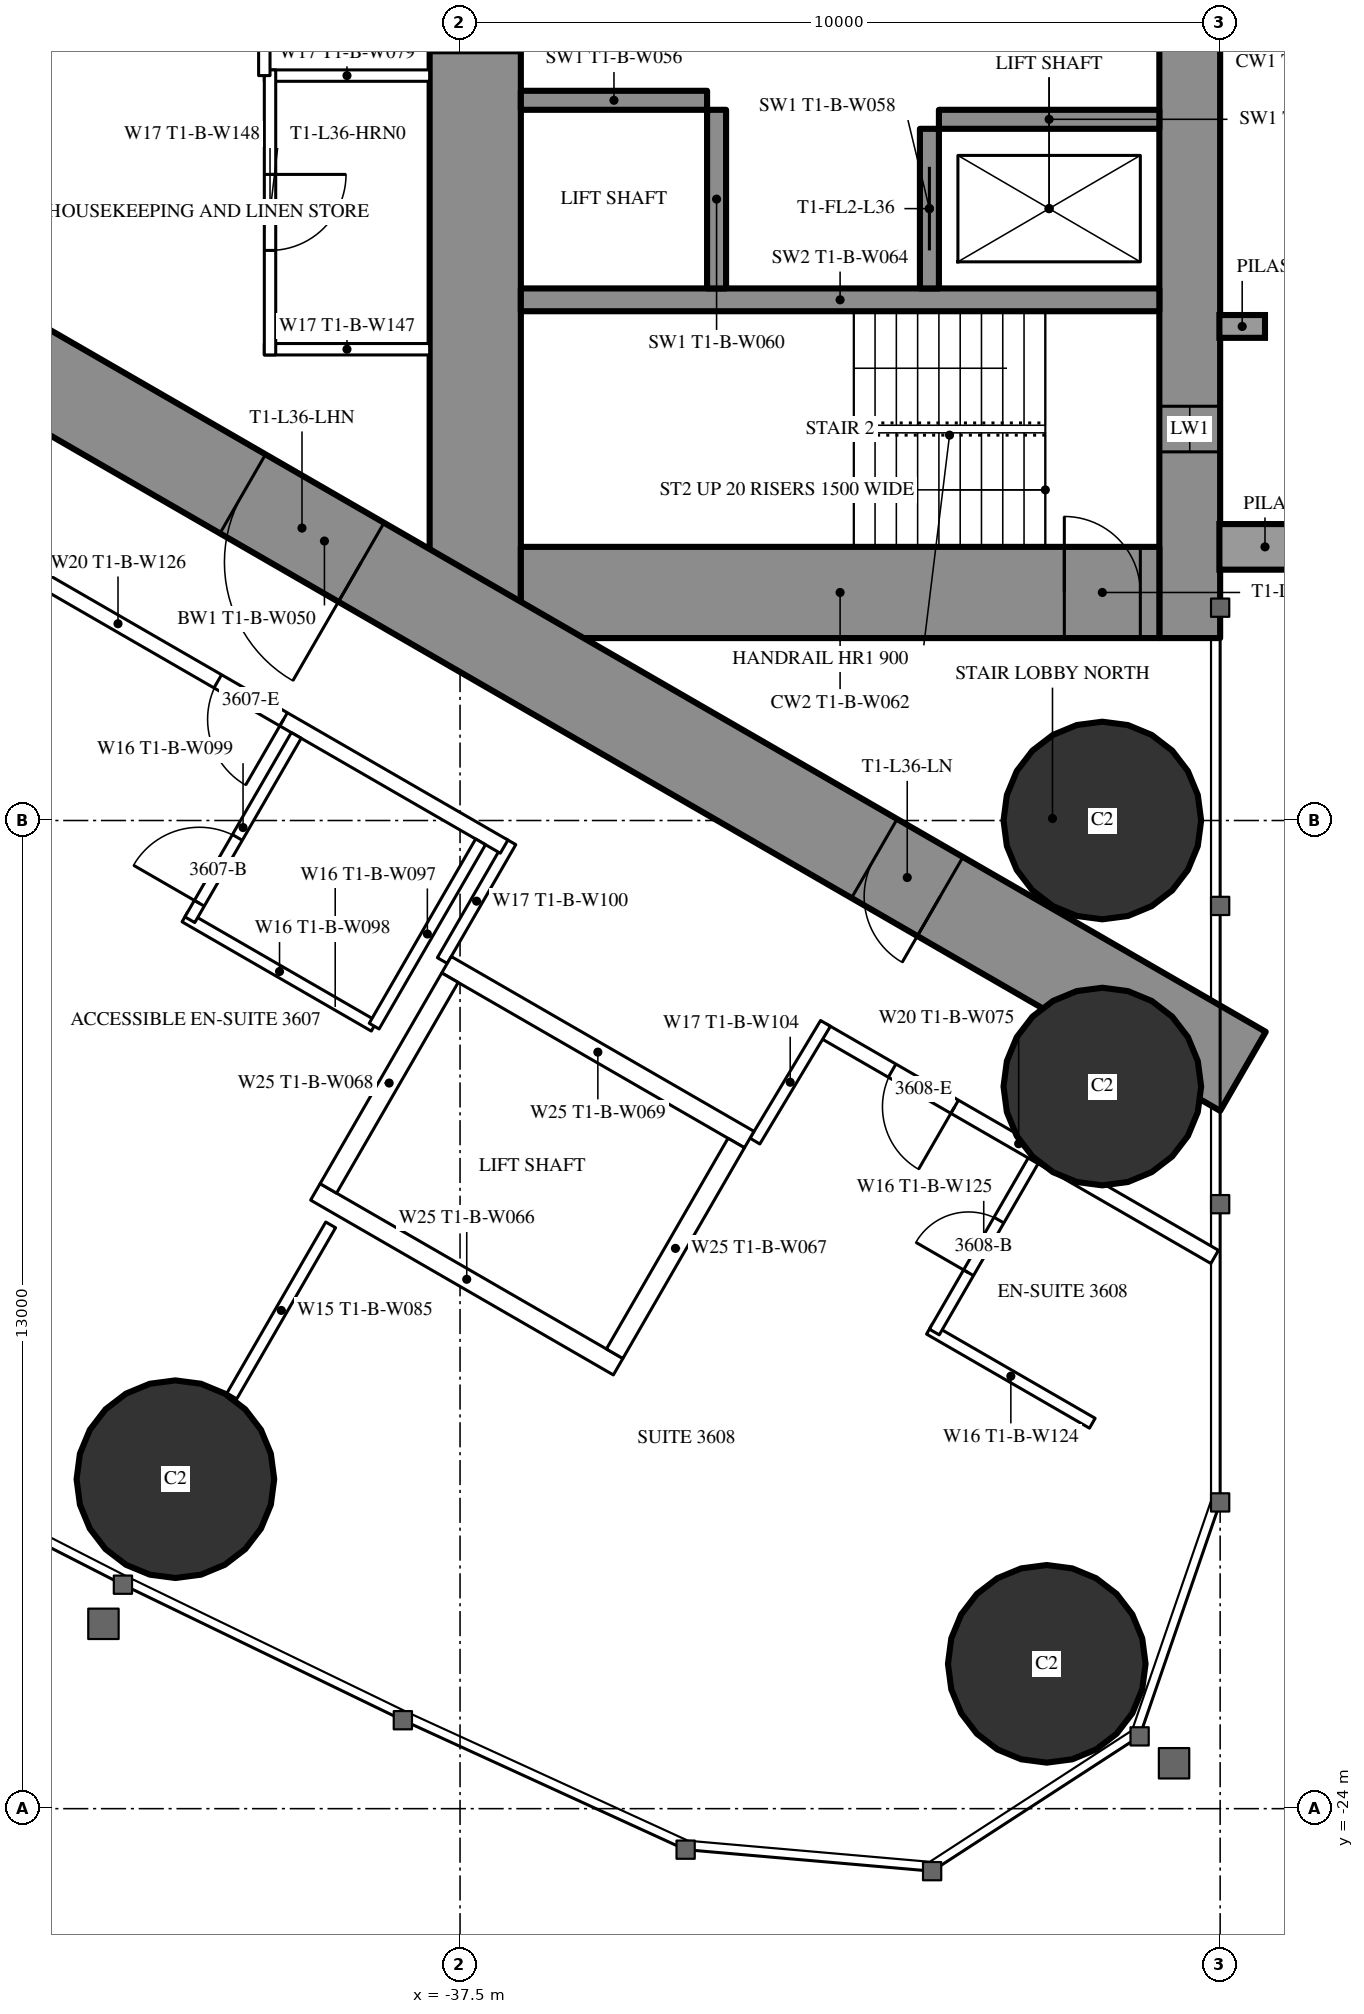
"""IFC4 building model, lengths in metres.
Left out: names, types, materials, properties, quantities, classifications, styles, units other than length and angle.
Written with IfcOpenShell. Run it as: python <this file> out.ifc"""

import sys

from ifc_helpers import new_model, si_unit, direction, frame, frame_2d, origin, origin_2d, place, context, subcontext, project, spatial, rectangle, hollow_circle, extrude, element, fill, save


model = new_model("IFC4")
c1 = context("Model", 3, precision=1e-05, world=origin(), true_north=direction((0.0, 1.0)))
c2 = subcontext(c1, "Body", "Model", "MODEL_VIEW")
j1 = project(units=[si_unit("LENGTHUNIT", "METRE"), si_unit("PLANEANGLEUNIT", "RADIAN")], contexts=[c1])
p1 = place(None, origin())
s1 = spatial("IfcSite", under=j1, at=p1, CompositionType="ELEMENT")
p2 = place(p1, origin())
s2 = spatial("IfcBuilding", under=s1, at=p2, CompositionType="ELEMENT")
p3 = place(p2, frame((0.0, 0.0, 136.1)))
s3 = spatial("IfcBuildingStorey", under=s2, at=p3, CompositionType="ELEMENT", Elevation=136.1)
for number, where, z_axis, x_axis in (
    (1, (-29.781, -22.095, 0.0), (0.0, 0.0, 1.0), (1.0, 0.0, 0.0)),
    (2, (-29.05, -11.0, 0.0), (0.0, 0.0, 1.0), (1.0, 0.0, 0.0)),
    (3, (-29.05, -14.5, 0.0), (0.0, 0.0, 1.0), (1.0, 0.0, 0.0)),
    (4, (-41.245, -19.666, 0.0), (0.0, 0.0, 1.0), (1.0, 0.0, 0.0)),
):
    element("IfcColumn", number, at=place(p3, frame(where, z_axis=z_axis, x_axis=x_axis)), inside=s3, PredefinedType="COLUMN", context=c2, shape_type="SweptSolid", body=[
        extrude(hollow_circle(Radius=1.3, WallThickness=0.1, at=origin_2d()), origin(), (0.0, 0.0, 1.0), 3.5),
    ])
p4 = place(p3, frame((-27.9, 8.6, 0.0), z_axis=(0.0, 0.0, 1.0), x_axis=(0.0, -1.0, 0.0)))
e5 = element("IfcWall", 5, at=p4, inside=s3, PredefinedType="SHEAR", context=c2, shape_type="SweptSolid", body=[
    extrude(rectangle(XDim=17.2, YDim=0.8, at=frame_2d((8.6, 0.0))), origin(), (0.0, 0.0, 1.0), 3.5),
])
p5 = place(p4, frame((2.45, 0.0, 0.6)))
e6 = element("IfcOpeningElement", 6, at=p5, cuts=e5, PredefinedType="OPENING", context=c2, shape_type="SweptSolid", body=[
    extrude(rectangle(XDim=0.6, YDim=2.1, at=frame_2d((0.3, 1.05))), frame((0.0, 0.41, 0.0), z_axis=(0.0, -1.0, 0.0), x_axis=(1.0, 0.0, 0.0)), (0.0, 0.0, 1.0), 0.82),
])
p6 = place(p4, frame((14.15, 0.0, 0.6)))
e7 = element("IfcOpeningElement", 7, at=p6, cuts=e5, PredefinedType="OPENING", context=c2, shape_type="SweptSolid", body=[
    extrude(rectangle(XDim=0.6, YDim=2.1, at=frame_2d((0.3, 1.05))), frame((0.0, 0.41, 0.0), z_axis=(0.0, -1.0, 0.0), x_axis=(1.0, 0.0, 0.0)), (0.0, 0.0, 1.0), 0.82),
])
p7 = place(p3, frame((-37.3, 8.6, 0.0), z_axis=(0.0, 0.0, 1.0), x_axis=(0.0, -1.0, 0.0)))
e8 = element("IfcWall", 8, at=p7, inside=s3, PredefinedType="SHEAR", context=c2, shape_type="SweptSolid", body=[
    extrude(rectangle(XDim=17.2, YDim=1.2, at=frame_2d((8.6, 0.0))), origin(), (0.0, 0.0, 1.0), 3.5),
])
p8 = place(p7, frame((7.7, 0.0, 0.0)))
e9 = element("IfcOpeningElement", 9, at=p8, cuts=e8, PredefinedType="OPENING", context=c2, shape_type="SweptSolid", body=[
    extrude(rectangle(XDim=1.8, YDim=2.2, at=frame_2d((0.9, 1.1))), frame((0.0, 0.61, 0.0), z_axis=(0.0, -1.0, 0.0), x_axis=(1.0, 0.0, 0.0)), (0.0, 0.0, 1.0), 1.22),
])
p9 = place(p3, frame((-28.3, -8.0, 0.0), z_axis=(0.0, 0.0, 1.0), x_axis=(-1.0, 0.0, 0.0)))
e10 = element("IfcWall", 10, at=p9, inside=s3, PredefinedType="SHEAR", context=c2, shape_type="SweptSolid", body=[
    extrude(rectangle(XDim=8.4, YDim=1.2, at=frame_2d((4.2, 0.0))), origin(), (0.0, 0.0, 1.0), 3.5),
])
p10 = place(p9, frame((0.25, 0.0, 0.0)))
e11 = element("IfcOpeningElement", 11, at=p10, cuts=e10, PredefinedType="OPENING", context=c2, shape_type="SweptSolid", body=[
    extrude(rectangle(XDim=1.0, YDim=2.2, at=frame_2d((0.5, 1.1))), frame((0.0, 0.61, 0.0), z_axis=(0.0, -1.0, 0.0), x_axis=(1.0, 0.0, 0.0)), (0.0, 0.0, 1.0), 1.22),
])
p11 = place(p3, frame((-28.3, -4.15, 0.0), z_axis=(0.0, 0.0, 1.0), x_axis=(-1.0, 0.0, 0.0)))
e12 = element("IfcWall", 12, at=p11, inside=s3, PredefinedType="SHEAR", context=c2, shape_type="SweptSolid", body=[
    extrude(rectangle(XDim=8.4, YDim=0.3, at=frame_2d((4.2, 0.0))), origin(), (0.0, 0.0, 1.0), 3.5),
])
p12 = place(p3, frame((-31.325, -1.9, 0.0), z_axis=(0.0, 0.0, 1.0), x_axis=(0.0, -1.0, 0.0)))
e13 = element("IfcWall", 13, at=p12, inside=s3, PredefinedType="SHEAR", context=c2, shape_type="SweptSolid", body=[
    extrude(rectangle(XDim=2.1, YDim=0.25, at=frame_2d((1.05, 0.0))), origin(), (0.0, 0.0, 1.0), 3.5),
])
p13 = place(p12, frame((0.5, 0.0, 0.0)))
e14 = element("IfcOpeningElement", 14, at=p13, cuts=e13, PredefinedType="OPENING", context=c2, shape_type="SweptSolid", body=[
    extrude(rectangle(XDim=1.1, YDim=2.2, at=frame_2d((0.55, 1.1))), frame((0.0, 0.135, 0.0), z_axis=(0.0, -1.0, 0.0), x_axis=(1.0, 0.0, 0.0)), (0.0, 0.0, 1.0), 0.27),
])
p14 = place(p3, frame((-34.125, -1.65, 0.0), z_axis=(0.0, 0.0, 1.0), x_axis=(0.0, -1.0, 0.0)))
e15 = element("IfcWall", 15, at=p14, inside=s3, PredefinedType="SHEAR", context=c2, shape_type="SweptSolid", body=[
    extrude(rectangle(XDim=2.35, YDim=0.25, at=frame_2d((1.175, 0.0))), origin(), (0.0, 0.0, 1.0), 3.5),
])
p15 = place(p3, frame((-28.3, -1.775, 0.0), z_axis=(0.0, 0.0, 1.0), x_axis=(-1.0, 0.0, 0.0)))
e16 = element("IfcWall", 16, at=p15, inside=s3, PredefinedType="SHEAR", context=c2, shape_type="SweptSolid", body=[
    extrude(rectangle(XDim=2.9, YDim=0.25, at=frame_2d((1.45, 0.0))), origin(), (0.0, 0.0, 1.0), 3.5),
])
p16 = place(p3, frame((-34.25, -1.525, 0.0), z_axis=(0.0, 0.0, 1.0), x_axis=(-1.0, 0.0, 0.0)))
e17 = element("IfcWall", 17, at=p16, inside=s3, PredefinedType="SHEAR", context=c2, shape_type="SweptSolid", body=[
    extrude(rectangle(XDim=2.45, YDim=0.25, at=frame_2d((1.225, 0.0))), origin(), (0.0, 0.0, 1.0), 3.5),
])
p17 = place(p3, frame((-27.2, -14.3, 0.0), z_axis=(0.0, 0.0, 1.0), x_axis=(-0.866024021859, 0.500002393557, 0.0)))
e18 = element("IfcWall", 18, at=p17, inside=s3, PredefinedType="SHEAR", context=c2, shape_type="SweptSolid", body=[
    extrude(rectangle(XDim=27.907, YDim=1.2, at=frame_2d((13.954, 0.0))), origin(), (0.0, 0.0, 1.0), 3.5),
])
p18 = place(p17, frame((4.6, 0.0, 0.0)))
e19 = element("IfcOpeningElement", 19, at=p18, cuts=e18, PredefinedType="OPENING", context=c2, shape_type="SweptSolid", body=[
    extrude(rectangle(XDim=1.0, YDim=2.2, at=frame_2d((0.5, 1.1))), frame((0.0, 0.61, 0.0), z_axis=(0.0, -1.0, 0.0), x_axis=(1.0, 0.0, 0.0)), (0.0, 0.0, 1.0), 1.22),
])
p19 = place(p17, frame((13.395, 0.0, 0.0)))
e20 = element("IfcOpeningElement", 20, at=p19, cuts=e18, PredefinedType="OPENING", context=c2, shape_type="SweptSolid", body=[
    extrude(rectangle(XDim=1.8, YDim=2.2, at=frame_2d((0.9, 1.1))), frame((0.0, 0.61, 0.0), z_axis=(0.0, -1.0, 0.0), x_axis=(1.0, 0.0, 0.0)), (0.0, 0.0, 1.0), 1.22),
])
p20 = place(p3, frame((-39.202, -16.32, 0.0), z_axis=(0.0, 0.0, 1.0), x_axis=(-0.49997716683, -0.86603858612, 0.0)))
e21 = element("IfcWall", 21, at=p20, inside=s3, PredefinedType="PARTITIONING", context=c2, shape_type="SweptSolid", body=[
    extrude(rectangle(XDim=2.6, YDim=0.15, at=frame_2d((1.3, 0.0))), origin(), (0.0, 0.0, 1.0), 3.25),
])
p21 = place(p3, frame((-27.572, -16.741, 0.0), z_axis=(0.0, 0.0, 1.0), x_axis=(-0.866024464444, 0.500001626982, 0.0)))
e22 = element("IfcWall", 22, at=p21, inside=s3, PredefinedType="PARTITIONING", context=c2, shape_type="SweptSolid", body=[
    extrude(rectangle(XDim=5.955, YDim=0.2, at=frame_2d((2.978, 0.0))), origin(), (0.0, 0.0, 1.0), 3.25),
])
p22 = place(p21, frame((3.95, 0.0, 0.0)))
e23 = element("IfcOpeningElement", 23, at=p22, cuts=e22, PredefinedType="OPENING", context=c2, shape_type="SweptSolid", body=[
    extrude(rectangle(XDim=0.95, YDim=2.2, at=frame_2d((0.475, 1.1))), frame((0.0, 0.11, 0.0), z_axis=(0.0, -1.0, 0.0), x_axis=(1.0, 0.0, 0.0)), (0.0, 0.0, 1.0), 0.22),
])
p23 = place(p3, frame((-36.831, -11.28, 0.0), z_axis=(0.0, 0.0, 1.0), x_axis=(-0.499937177781, -0.866061671171, 0.0)))
e24 = element("IfcWall", 24, at=p23, inside=s3, PredefinedType="PARTITIONING", context=c2, shape_type="SweptSolid", body=[
    extrude(rectangle(XDim=1.804, YDim=0.15, at=frame_2d((0.902, 0.0))), origin(), (0.0, 0.0, 1.0), 3.25),
])
p24 = place(p3, frame((-33.621, -15.218, 0.0), z_axis=(0.0, 0.0, 1.0), x_axis=(0.514336634837, 0.857588377991, 0.0)))
e25 = element("IfcWall", 25, at=p24, inside=s3, PredefinedType="PARTITIONING", context=c2, shape_type="SweptSolid", body=[
    extrude(rectangle(XDim=1.805, YDim=0.15, at=frame_2d((0.903, 0.0))), origin(), (0.0, 0.0, 1.0), 3.25),
])
p25 = place(p3, frame((-36.92, -11.344, 0.0), z_axis=(0.0, 0.0, 1.0), x_axis=(-0.866027897759, 0.499995680284, 0.0)))
e26 = element("IfcWall", 26, at=p25, inside=s3, PredefinedType="PARTITIONING", context=c2, shape_type="SweptSolid", body=[
    extrude(rectangle(XDim=11.731, YDim=0.2, at=frame_2d((5.865, 0.0))), origin(), (0.0, 0.0, 1.0), 3.25),
])
p26 = place(p25, frame((3.35, 0.0, 0.0)))
e27 = element("IfcOpeningElement", 27, at=p26, cuts=e26, PredefinedType="OPENING", context=c2, shape_type="SweptSolid", body=[
    extrude(rectangle(XDim=1.0, YDim=2.2, at=frame_2d((0.5, 1.1))), frame((0.0, 0.11, 0.0), z_axis=(0.0, -1.0, 0.0), x_axis=(1.0, 0.0, 0.0)), (0.0, 0.0, 1.0), 0.22),
])
p27 = place(p3, frame((-38.63, -13.705, 0.0), z_axis=(0.0, 0.0, 1.0), x_axis=(-0.866018712932, 0.500011588718, 0.0)))
e28 = element("IfcWall", 28, at=p27, inside=s3, PredefinedType="PARTITIONING", context=c2, shape_type="SweptSolid", body=[
    extrude(rectangle(XDim=2.875, YDim=0.15, at=frame_2d((1.438, 0.0))), origin(), (0.0, 0.0, 1.0), 3.25),
])
p28 = place(p3, frame((-39.655, -9.88, 0.0), z_axis=(0.0, 0.0, 1.0), x_axis=(-0.500049511043, -0.865996816683, 0.0)))
e29 = element("IfcWall", 29, at=p28, inside=s3, PredefinedType="PARTITIONING", context=c2, shape_type="SweptSolid", body=[
    extrude(rectangle(XDim=2.8, YDim=0.15, at=frame_2d((1.4, 0.0))), origin(), (0.0, 0.0, 1.0), 3.25),
])
p29 = place(p28, frame((1.55, 0.0, 0.0)))
e30 = element("IfcOpeningElement", 30, at=p29, cuts=e29, PredefinedType="OPENING", context=c2, shape_type="SweptSolid", body=[
    extrude(rectangle(XDim=1.0, YDim=2.2, at=frame_2d((0.5, 1.1))), frame((0.0, 0.085, 0.0), z_axis=(0.0, -1.0, 0.0), x_axis=(1.0, 0.0, 0.0)), (0.0, 0.0, 1.0), 0.17),
])
p30 = place(p3, frame((-37.23, -11.281, 0.0), z_axis=(0.0, 0.0, 1.0), x_axis=(-0.500049511043, -0.865996816683, 0.0)))
e31 = element("IfcWall", 31, at=p30, inside=s3, PredefinedType="PARTITIONING", context=c2, shape_type="SweptSolid", body=[
    extrude(rectangle(XDim=2.8, YDim=0.15, at=frame_2d((1.4, 0.0))), origin(), (0.0, 0.0, 1.0), 3.25),
])
p31 = place(p3, frame((-29.182, -18.929, 0.0), z_axis=(0.0, 0.0, 1.0), x_axis=(-0.866006523861, 0.500032699561, 0.0)))
e32 = element("IfcWall", 32, at=p31, inside=s3, PredefinedType="PARTITIONING", context=c2, shape_type="SweptSolid", body=[
    extrude(rectangle(XDim=2.475, YDim=0.15, at=frame_2d((1.237, 0.0))), origin(), (0.0, 0.0, 1.0), 3.25),
])
p32 = place(p3, frame((-29.96, -15.478, 0.0), z_axis=(0.0, 0.0, 1.0), x_axis=(-0.500006934395, -0.866021400173, 0.0)))
e33 = element("IfcWall", 33, at=p32, inside=s3, PredefinedType="PARTITIONING", context=c2, shape_type="SweptSolid", body=[
    extrude(rectangle(XDim=2.6, YDim=0.15, at=frame_2d((1.3, 0.0))), origin(), (0.0, 0.0, 1.0), 3.25),
])
p33 = place(p32, frame((0.9, 0.0, 0.0)))
e34 = element("IfcOpeningElement", 34, at=p33, cuts=e33, PredefinedType="OPENING", context=c2, shape_type="SweptSolid", body=[
    extrude(rectangle(XDim=0.8, YDim=2.2, at=frame_2d((0.4, 1.1))), frame((0.0, 0.085, 0.0), z_axis=(0.0, -1.0, 0.0), x_axis=(1.0, 0.0, 0.0)), (0.0, 0.0, 1.0), 0.17),
])
for number, where, z_axis, x_axis in (
    (35, (-37.9, -1.2, 0.0), (0.0, 0.0, 1.0), (-1.0, 0.0, 0.0)),
    (36, (-37.9, -4.8, 0.0), (0.0, 0.0, 1.0), (-1.0, 0.0, 0.0)),
):
    element("IfcWall", number, at=place(p3, frame(where, z_axis=z_axis, x_axis=x_axis)), inside=s3, PredefinedType="PARTITIONING", context=c2, shape_type="SweptSolid", body=[
        extrude(rectangle(XDim=2.175, YDim=0.15, at=frame_2d((1.087, 0.0))), origin(), (0.0, 0.0, 1.0), 3.25),
    ])
p34 = place(p3, frame((-40.0, -1.125, 0.0), z_axis=(0.0, 0.0, 1.0), x_axis=(0.0, -1.0, 0.0)))
e37 = element("IfcWall", 37, at=p34, inside=s3, PredefinedType="PARTITIONING", context=c2, shape_type="SweptSolid", body=[
    extrude(rectangle(XDim=3.75, YDim=0.15, at=frame_2d((1.875, 0.0))), origin(), (0.0, 0.0, 1.0), 3.25),
])
p35 = place(p34, frame((1.375, 0.0, 0.0)))
e38 = element("IfcOpeningElement", 38, at=p35, cuts=e37, PredefinedType="OPENING", context=c2, shape_type="SweptSolid", body=[
    extrude(rectangle(XDim=1.0, YDim=2.2, at=frame_2d((0.5, 1.1))), frame((0.0, 0.085, 0.0), z_axis=(0.0, -1.0, 0.0), x_axis=(1.0, 0.0, 0.0)), (0.0, 0.0, 1.0), 0.17),
])
p36 = place(p3, frame((-40.075, 6.174, 0.0), z_axis=(0.0, 0.0, 1.0), x_axis=(0.0, -1.0, 0.0)))
e39 = element("IfcWall", 39, at=p36, inside=s3, PredefinedType="PARTITIONING", context=c2, shape_type="SweptSolid", body=[
    extrude(rectangle(XDim=7.374, YDim=0.15, at=frame_2d((3.687, 0.0))), origin(), (0.0, 0.0, 1.0), 3.25),
])
p37 = place(p36, frame((2.787, 0.0, 0.0)))
e40 = element("IfcOpeningElement", 40, at=p37, cuts=e39, PredefinedType="OPENING", context=c2, shape_type="SweptSolid", body=[
    extrude(rectangle(XDim=1.8, YDim=2.2, at=frame_2d((0.9, 1.1))), frame((0.0, 0.085, 0.0), z_axis=(0.0, -1.0, 0.0), x_axis=(1.0, 0.0, 0.0)), (0.0, 0.0, 1.0), 0.17),
])
p38 = place(p3, frame((-33.696, -15.197, 0.0), z_axis=(0.0, 0.0, 1.0), x_axis=(-0.865976953817, 0.500083908417, 0.0)))
e41 = element("IfcWall", 41, at=p38, inside=s3, PredefinedType="PARTITIONING", context=c2, shape_type="SweptSolid", body=[
    extrude(rectangle(XDim=4.599, YDim=0.25, at=frame_2d((2.3, 0.0))), origin(), (0.0, 0.0, 1.0), 3.25),
])
p39 = place(p3, frame((-35.42, -18.186, 0.0), z_axis=(0.0, 0.0, 1.0), x_axis=(-0.865990227814, 0.50006092162, 0.0)))
e42 = element("IfcWall", 42, at=p39, inside=s3, PredefinedType="PARTITIONING", context=c2, shape_type="SweptSolid", body=[
    extrude(rectangle(XDim=4.6, YDim=0.25, at=frame_2d((2.3, 0.0))), origin(), (0.0, 0.0, 1.0), 3.25),
])
p40 = place(p3, frame((-33.866, -15.243, 0.0), z_axis=(0.0, 0.0, 1.0), x_axis=(-0.499929347863, -0.866066190972, 0.0)))
e43 = element("IfcWall", 43, at=p40, inside=s3, PredefinedType="PARTITIONING", context=c2, shape_type="SweptSolid", body=[
    extrude(rectangle(XDim=3.201, YDim=0.25, at=frame_2d((1.6, 0.0))), origin(), (0.0, 0.0, 1.0), 3.25),
])
p41 = place(p3, frame((-37.633, -13.068, 0.0), z_axis=(0.0, 0.0, 1.0), x_axis=(-0.499872130319, -0.866099216793, 0.0)))
e44 = element("IfcWall", 44, at=p41, inside=s3, PredefinedType="PARTITIONING", context=c2, shape_type="SweptSolid", body=[
    extrude(rectangle(XDim=3.2, YDim=0.25, at=frame_2d((1.6, 0.0))), origin(), (0.0, 0.0, 1.0), 3.25),
])
p42 = place(p29, origin())
e45 = element("IfcDoor", 45, at=p42, inside=s3, OperationType="SINGLE_SWING_RIGHT", PredefinedType="DOOR", context=c2, shape_type="SweptSolid", body=[
    extrude(rectangle(XDim=1.0, YDim=2.2, at=frame_2d((0.5, 1.1))), frame((0.0, 0.025, 0.0), z_axis=(0.0, -1.0, 0.0), x_axis=(1.0, 0.0, 0.0)), (0.0, 0.0, 1.0), 0.05),
])
fill(e30, e45)
p43 = place(p26, origin())
e46 = element("IfcDoor", 46, at=p43, inside=s3, OperationType="SINGLE_SWING_LEFT", PredefinedType="DOOR", context=c2, shape_type="SweptSolid", body=[
    extrude(rectangle(XDim=1.0, YDim=2.2, at=frame_2d((0.5, 1.1))), frame((0.0, 0.025, 0.0), z_axis=(0.0, -1.0, 0.0), x_axis=(1.0, 0.0, 0.0)), (0.0, 0.0, 1.0), 0.05),
])
fill(e27, e46)
p44 = place(p33, origin())
e47 = element("IfcDoor", 47, at=p44, inside=s3, OperationType="SINGLE_SWING_RIGHT", PredefinedType="DOOR", context=c2, shape_type="SweptSolid", body=[
    extrude(rectangle(XDim=0.8, YDim=2.2, at=frame_2d((0.4, 1.1))), frame((0.0, 0.025, 0.0), z_axis=(0.0, -1.0, 0.0), x_axis=(1.0, 0.0, 0.0)), (0.0, 0.0, 1.0), 0.05),
])
fill(e34, e47)
p45 = place(p22, origin())
e48 = element("IfcDoor", 48, at=p45, inside=s3, OperationType="SINGLE_SWING_LEFT", PredefinedType="DOOR", context=c2, shape_type="SweptSolid", body=[
    extrude(rectangle(XDim=0.95, YDim=2.2, at=frame_2d((0.475, 1.1))), frame((0.0, 0.025, 0.0), z_axis=(0.0, -1.0, 0.0), x_axis=(1.0, 0.0, 0.0)), (0.0, 0.0, 1.0), 0.05),
])
fill(e23, e48)
p46 = place(p35, origin())
e49 = element("IfcDoor", 49, at=p46, inside=s3, OperationType="SINGLE_SWING_LEFT", PredefinedType="DOOR", context=c2, shape_type="SweptSolid", body=[
    extrude(rectangle(XDim=1.0, YDim=2.2, at=frame_2d((0.5, 1.1))), frame((0.0, 0.025, 0.0), z_axis=(0.0, -1.0, 0.0), x_axis=(1.0, 0.0, 0.0)), (0.0, 0.0, 1.0), 0.05),
])
fill(e38, e49)
p47 = place(p18, origin())
e50 = element("IfcDoor", 50, at=p47, inside=s3, OperationType="SINGLE_SWING_LEFT", PredefinedType="DOOR", context=c2, shape_type="SweptSolid", body=[
    extrude(rectangle(XDim=1.0, YDim=2.2, at=frame_2d((0.5, 1.1))), frame((0.0, 0.025, 0.0), z_axis=(0.0, -1.0, 0.0), x_axis=(1.0, 0.0, 0.0)), (0.0, 0.0, 1.0), 0.05),
])
fill(e19, e50)
p48 = place(p19, origin())
e51 = element("IfcDoor", 51, at=p48, inside=s3, OperationType="DOUBLE_DOOR_SINGLE_SWING", PredefinedType="DOOR", context=c2, shape_type="SweptSolid", body=[
    extrude(rectangle(XDim=1.8, YDim=2.2, at=frame_2d((0.9, 1.1))), frame((0.0, 0.025, 0.0), z_axis=(0.0, -1.0, 0.0), x_axis=(1.0, 0.0, 0.0)), (0.0, 0.0, 1.0), 0.05),
])
fill(e20, e51)
p49 = place(p10, origin())
e52 = element("IfcDoor", 52, at=p49, inside=s3, OperationType="SINGLE_SWING_RIGHT", PredefinedType="DOOR", context=c2, shape_type="SweptSolid", body=[
    extrude(rectangle(XDim=1.0, YDim=2.2, at=frame_2d((0.5, 1.1))), frame((0.0, 0.025, 0.0), z_axis=(0.0, -1.0, 0.0), x_axis=(1.0, 0.0, 0.0)), (0.0, 0.0, 1.0), 0.05),
])
fill(e11, e52)
p50 = place(p13, origin())
e53 = element("IfcDoor", 53, at=p50, inside=s3, OperationType="SLIDING_TO_LEFT", PredefinedType="USERDEFINED", context=c2, shape_type="SweptSolid", body=[
    extrude(rectangle(XDim=1.1, YDim=2.2, at=frame_2d((0.55, 1.1))), frame((0.0, 0.025, 0.0), z_axis=(0.0, -1.0, 0.0), x_axis=(1.0, 0.0, 0.0)), (0.0, 0.0, 1.0), 0.05),
])
fill(e14, e53)
p51 = place(p6, origin())
e54 = element("IfcWindow", 54, at=p51, inside=s3, PartitioningType="SINGLE_PANEL", PredefinedType="WINDOW", context=c2, shape_type="SweptSolid", body=[
    extrude(rectangle(XDim=0.6, YDim=2.1, at=frame_2d((0.3, 1.05))), frame((0.0, 0.03, 0.0), z_axis=(0.0, -1.0, 0.0), x_axis=(1.0, 0.0, 0.0)), (0.0, 0.0, 1.0), 0.06),
])
fill(e7, e54)
save(model, sys.argv[1])
